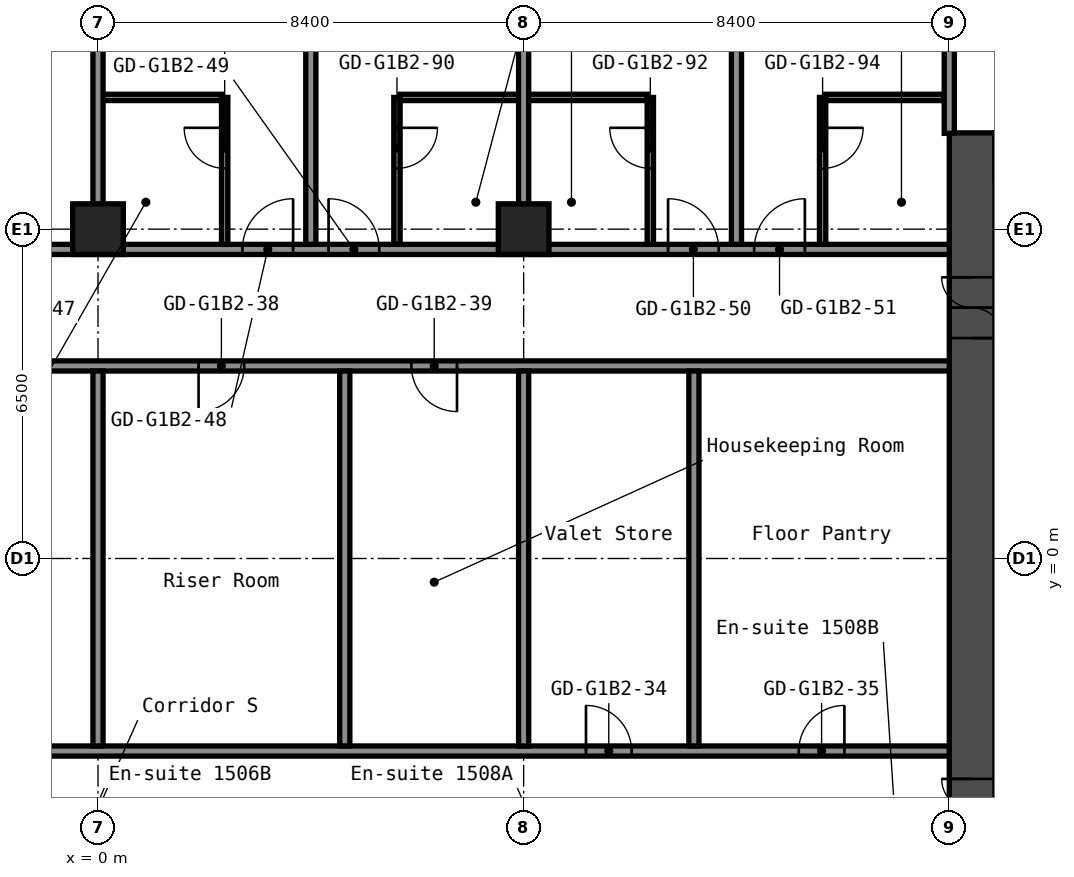
"""IFC4 building model, lengths in metres.
Left out: names, types, materials, properties, quantities, classifications, styles, units other than length and angle.
Written with IfcOpenShell. Run it as: python <this file> out.ifc"""

import sys

from ifc_helpers import new_model, si_unit, direction, frame, frame_2d, origin, origin_2d, place, context, subcontext, project, spatial, rectangle, hollow_rectangle, extrude, element, fill, save


model = new_model("IFC4")
c1 = context("Model", 3, precision=1e-05, world=origin(), true_north=direction((0.0, 1.0)))
c2 = subcontext(c1, "Body", "Model", "MODEL_VIEW")
j1 = project(units=[si_unit("LENGTHUNIT", "METRE"), si_unit("PLANEANGLEUNIT", "RADIAN")], contexts=[c1])
p1 = place(None, origin())
s1 = spatial("IfcSite", under=j1, at=p1, CompositionType="ELEMENT")
p2 = place(p1, origin())
s2 = spatial("IfcBuilding", under=s1, at=p2, CompositionType="ELEMENT")
p3 = place(p2, frame((0.0, 0.0, 55.0)))
s3 = spatial("IfcBuildingStorey", under=s2, at=p3, CompositionType="ELEMENT", Elevation=55.0)
for number, where, z_axis, x_axis in (
    (1, (0.0, 6.5, 0.0), (0.0, 0.0, 1.0), (1.0, 0.0, 0.0)),
    (2, (8.4, 6.5, 0.0), (0.0, 0.0, 1.0), (1.0, 0.0, 0.0)),
):
    element("IfcColumn", number, at=place(p3, frame(where, z_axis=z_axis, x_axis=x_axis)), inside=s3, PredefinedType="COLUMN", context=c2, shape_type="SweptSolid", body=[
        extrude(hollow_rectangle(XDim=1.0, YDim=1.0, WallThickness=0.04, at=origin_2d()), origin(), (0.0, 0.0, 1.0), 2.8),
    ])
p4 = place(p3, frame((17.25, -8.4, 0.0), z_axis=(0.0, 0.0, 1.0), x_axis=(0.0, 1.0, 0.0)))
e3 = element("IfcWall", 3, at=p4, inside=s3, PredefinedType="SHEAR", context=c2, shape_type="SweptSolid", body=[
    extrude(rectangle(XDim=16.8, YDim=0.9, at=frame_2d((8.4, 0.0))), origin(), (0.0, 0.0, 1.0), 2.8),
])
p5 = place(p4, frame((12.75, 0.0, 0.0)))
e4 = element("IfcOpeningElement", 4, at=p5, cuts=e3, PredefinedType="OPENING", context=c2, shape_type="SweptSolid", body=[
    extrude(rectangle(XDim=1.2, YDim=2.1, at=frame_2d((0.6, 1.05))), frame((0.0, 0.46, 0.0), z_axis=(0.0, -1.0, 0.0), x_axis=(1.0, 0.0, 0.0)), (0.0, 0.0, 1.0), 0.92),
])
p6 = place(p4, frame((2.85, 0.0, 0.0)))
e5 = element("IfcOpeningElement", 5, at=p6, cuts=e3, PredefinedType="OPENING", context=c2, shape_type="SweptSolid", body=[
    extrude(rectangle(XDim=1.2, YDim=2.1, at=frame_2d((0.6, 1.05))), frame((0.0, 0.46, 0.0), z_axis=(0.0, -1.0, 0.0), x_axis=(1.0, 0.0, 0.0)), (0.0, 0.0, 1.0), 0.92),
])
p7 = place(p3, frame((17.7, 7.95, 0.0), z_axis=(0.0, 0.0, 1.0), x_axis=(1.0, 0.0, 0.0)))
e6 = element("IfcWall", 6, at=p7, inside=s3, PredefinedType="SHEAR", context=c2, shape_type="SweptSolid", body=[
    extrude(rectangle(XDim=15.0, YDim=0.9, at=frame_2d((7.5, 0.0))), origin(), (0.0, 0.0, 1.0), 2.8),
])
p8 = place(p7, frame((10.4, 0.0, 0.0)))
e7 = element("IfcOpeningElement", 7, at=p8, cuts=e6, PredefinedType="OPENING", context=c2, shape_type="SweptSolid", body=[
    extrude(rectangle(XDim=1.2, YDim=2.1, at=frame_2d((0.6, 1.05))), frame((0.0, 0.46, 0.0), z_axis=(0.0, -1.0, 0.0), x_axis=(1.0, 0.0, 0.0)), (0.0, 0.0, 1.0), 0.92),
])
p9 = place(p7, frame((13.35, 0.0, 0.0)))
e8 = element("IfcOpeningElement", 8, at=p9, cuts=e6, PredefinedType="OPENING", context=c2, shape_type="SweptSolid", body=[
    extrude(rectangle(XDim=0.9, YDim=2.1, at=frame_2d((0.45, 1.05))), frame((0.0, 0.46, 0.0), z_axis=(0.0, -1.0, 0.0), x_axis=(1.0, 0.0, 0.0)), (0.0, 0.0, 1.0), 0.92),
])
p10 = place(p3, frame((-16.8, -3.8, 0.0), z_axis=(0.0, 0.0, 1.0), x_axis=(1.0, 0.0, 0.0)))
e9 = element("IfcWall", 9, at=p10, inside=s3, PredefinedType="PARTITIONING", context=c2, shape_type="SweptSolid", body=[
    extrude(rectangle(XDim=33.6, YDim=0.2, at=frame_2d((16.8, 0.0))), origin(), (0.0, 0.0, 1.0), 2.8),
])
p11 = place(p10, frame((9.8, 0.0, 0.0)))
e10 = element("IfcOpeningElement", 10, at=p11, cuts=e9, PredefinedType="OPENING", context=c2, shape_type="SweptSolid", body=[
    extrude(rectangle(XDim=0.9, YDim=2.1, at=frame_2d((0.45, 1.05))), frame((0.0, 0.11, 0.0), z_axis=(0.0, -1.0, 0.0), x_axis=(1.0, 0.0, 0.0)), (0.0, 0.0, 1.0), 0.22),
])
p12 = place(p10, frame((14.0, 0.0, 0.0)))
e11 = element("IfcOpeningElement", 11, at=p12, cuts=e9, PredefinedType="OPENING", context=c2, shape_type="SweptSolid", body=[
    extrude(rectangle(XDim=0.9, YDim=2.1, at=frame_2d((0.45, 1.05))), frame((0.0, 0.11, 0.0), z_axis=(0.0, -1.0, 0.0), x_axis=(1.0, 0.0, 0.0)), (0.0, 0.0, 1.0), 0.22),
])
p13 = place(p10, frame((26.43, 0.0, 0.0)))
e12 = element("IfcOpeningElement", 12, at=p13, cuts=e9, PredefinedType="OPENING", context=c2, shape_type="SweptSolid", body=[
    extrude(rectangle(XDim=0.9, YDim=2.1, at=frame_2d((0.45, 1.05))), frame((0.0, 0.11, 0.0), z_axis=(0.0, -1.0, 0.0), x_axis=(1.0, 0.0, 0.0)), (0.0, 0.0, 1.0), 0.22),
])
p14 = place(p10, frame((30.63, 0.0, 0.0)))
e13 = element("IfcOpeningElement", 13, at=p14, cuts=e9, PredefinedType="OPENING", context=c2, shape_type="SweptSolid", body=[
    extrude(rectangle(XDim=0.9, YDim=2.1, at=frame_2d((0.45, 1.05))), frame((0.0, 0.11, 0.0), z_axis=(0.0, -1.0, 0.0), x_axis=(1.0, 0.0, 0.0)), (0.0, 0.0, 1.0), 0.22),
])
p15 = place(p3, frame((-16.8, 3.8, 0.0), z_axis=(0.0, 0.0, 1.0), x_axis=(1.0, 0.0, 0.0)))
e14 = element("IfcWall", 14, at=p15, inside=s3, PredefinedType="PARTITIONING", context=c2, shape_type="SweptSolid", body=[
    extrude(rectangle(XDim=33.6, YDim=0.2, at=frame_2d((16.8, 0.0))), origin(), (0.0, 0.0, 1.0), 2.8),
])
p16 = place(p15, frame((1.48, 0.0, 0.0)))
e15 = element("IfcOpeningElement", 15, at=p16, cuts=e14, PredefinedType="OPENING", context=c2, shape_type="SweptSolid", body=[
    extrude(rectangle(XDim=0.9, YDim=2.1, at=frame_2d((0.45, 1.05))), frame((0.0, 0.11, 0.0), z_axis=(0.0, -1.0, 0.0), x_axis=(1.0, 0.0, 0.0)), (0.0, 0.0, 1.0), 0.22),
])
p17 = place(p15, frame((5.68, 0.0, 0.0)))
e16 = element("IfcOpeningElement", 16, at=p17, cuts=e14, PredefinedType="OPENING", context=c2, shape_type="SweptSolid", body=[
    extrude(rectangle(XDim=0.9, YDim=2.1, at=frame_2d((0.45, 1.05))), frame((0.0, 0.11, 0.0), z_axis=(0.0, -1.0, 0.0), x_axis=(1.0, 0.0, 0.0)), (0.0, 0.0, 1.0), 0.22),
])
p18 = place(p15, frame((18.785, 0.0, 0.0)))
e17 = element("IfcOpeningElement", 17, at=p18, cuts=e14, PredefinedType="OPENING", context=c2, shape_type="SweptSolid", body=[
    extrude(rectangle(XDim=0.9, YDim=2.1, at=frame_2d((0.45, 1.05))), frame((0.0, 0.11, 0.0), z_axis=(0.0, -1.0, 0.0), x_axis=(1.0, 0.0, 0.0)), (0.0, 0.0, 1.0), 0.22),
])
p19 = place(p15, frame((22.985, 0.0, 0.0)))
e18 = element("IfcOpeningElement", 18, at=p19, cuts=e14, PredefinedType="OPENING", context=c2, shape_type="SweptSolid", body=[
    extrude(rectangle(XDim=0.9, YDim=2.1, at=frame_2d((0.45, 1.05))), frame((0.0, 0.11, 0.0), z_axis=(0.0, -1.0, 0.0), x_axis=(1.0, 0.0, 0.0)), (0.0, 0.0, 1.0), 0.22),
])
p20 = place(p3, frame((-16.8, 6.1, 0.0), z_axis=(0.0, 0.0, 1.0), x_axis=(1.0, 0.0, 0.0)))
e19 = element("IfcWall", 19, at=p20, inside=s3, PredefinedType="PARTITIONING", context=c2, shape_type="SweptSolid", body=[
    extrude(rectangle(XDim=33.6, YDim=0.2, at=frame_2d((16.8, 0.0))), origin(), (0.0, 0.0, 1.0), 2.8),
])
p21 = place(p20, frame((2.85, 0.0, 0.0)))
e20 = element("IfcOpeningElement", 20, at=p21, cuts=e19, PredefinedType="OPENING", context=c2, shape_type="SweptSolid", body=[
    extrude(rectangle(XDim=1.0, YDim=2.1, at=frame_2d((0.5, 1.05))), frame((0.0, 0.11, 0.0), z_axis=(0.0, -1.0, 0.0), x_axis=(1.0, 0.0, 0.0)), (0.0, 0.0, 1.0), 0.22),
])
p22 = place(p20, frame((4.55, 0.0, 0.0)))
e21 = element("IfcOpeningElement", 21, at=p22, cuts=e19, PredefinedType="OPENING", context=c2, shape_type="SweptSolid", body=[
    extrude(rectangle(XDim=1.0, YDim=2.1, at=frame_2d((0.5, 1.05))), frame((0.0, 0.11, 0.0), z_axis=(0.0, -1.0, 0.0), x_axis=(1.0, 0.0, 0.0)), (0.0, 0.0, 1.0), 0.22),
])
p23 = place(p20, frame((10.555, 0.0, 0.0)))
e22 = element("IfcOpeningElement", 22, at=p23, cuts=e19, PredefinedType="OPENING", context=c2, shape_type="SweptSolid", body=[
    extrude(rectangle(XDim=0.9, YDim=2.1, at=frame_2d((0.45, 1.05))), frame((0.0, 0.11, 0.0), z_axis=(0.0, -1.0, 0.0), x_axis=(1.0, 0.0, 0.0)), (0.0, 0.0, 1.0), 0.22),
])
p24 = place(p20, frame((14.755, 0.0, 0.0)))
e23 = element("IfcOpeningElement", 23, at=p24, cuts=e19, PredefinedType="OPENING", context=c2, shape_type="SweptSolid", body=[
    extrude(rectangle(XDim=0.9, YDim=2.1, at=frame_2d((0.45, 1.05))), frame((0.0, 0.11, 0.0), z_axis=(0.0, -1.0, 0.0), x_axis=(1.0, 0.0, 0.0)), (0.0, 0.0, 1.0), 0.22),
])
p25 = place(p20, frame((19.65, 0.0, 0.0)))
e24 = element("IfcOpeningElement", 24, at=p25, cuts=e19, PredefinedType="OPENING", context=c2, shape_type="SweptSolid", body=[
    extrude(rectangle(XDim=1.0, YDim=2.1, at=frame_2d((0.5, 1.05))), frame((0.0, 0.11, 0.0), z_axis=(0.0, -1.0, 0.0), x_axis=(1.0, 0.0, 0.0)), (0.0, 0.0, 1.0), 0.22),
])
p26 = place(p20, frame((21.35, 0.0, 0.0)))
e25 = element("IfcOpeningElement", 25, at=p26, cuts=e19, PredefinedType="OPENING", context=c2, shape_type="SweptSolid", body=[
    extrude(rectangle(XDim=1.0, YDim=2.1, at=frame_2d((0.5, 1.05))), frame((0.0, 0.11, 0.0), z_axis=(0.0, -1.0, 0.0), x_axis=(1.0, 0.0, 0.0)), (0.0, 0.0, 1.0), 0.22),
])
p27 = place(p20, frame((28.05, 0.0, 0.0)))
e26 = element("IfcOpeningElement", 26, at=p27, cuts=e19, PredefinedType="OPENING", context=c2, shape_type="SweptSolid", body=[
    extrude(rectangle(XDim=1.0, YDim=2.1, at=frame_2d((0.5, 1.05))), frame((0.0, 0.11, 0.0), z_axis=(0.0, -1.0, 0.0), x_axis=(1.0, 0.0, 0.0)), (0.0, 0.0, 1.0), 0.22),
])
p28 = place(p20, frame((29.75, 0.0, 0.0)))
e27 = element("IfcOpeningElement", 27, at=p28, cuts=e19, PredefinedType="OPENING", context=c2, shape_type="SweptSolid", body=[
    extrude(rectangle(XDim=1.0, YDim=2.1, at=frame_2d((0.5, 1.05))), frame((0.0, 0.11, 0.0), z_axis=(0.0, -1.0, 0.0), x_axis=(1.0, 0.0, 0.0)), (0.0, 0.0, 1.0), 0.22),
])
p29 = place(p3, frame((0.1, 9.1, 0.0), z_axis=(0.0, 0.0, 1.0), x_axis=(1.0, 0.0, 0.0)))
e28 = element("IfcWall", 28, at=p29, inside=s3, PredefinedType="PARTITIONING", context=c2, shape_type="SweptSolid", body=[
    extrude(rectangle(XDim=2.337, YDim=0.125, at=frame_2d((1.169, 0.0))), origin(), (0.0, 0.0, 1.0), 2.8),
])
p30 = place(p3, frame((5.962, 9.1, 0.0), z_axis=(0.0, 0.0, 1.0), x_axis=(1.0, 0.0, 0.0)))
e29 = element("IfcWall", 29, at=p30, inside=s3, PredefinedType="PARTITIONING", context=c2, shape_type="SweptSolid", body=[
    extrude(rectangle(XDim=4.875, YDim=0.125, at=frame_2d((2.438, 0.0))), origin(), (0.0, 0.0, 1.0), 2.8),
])
p31 = place(p3, frame((14.363, 9.1, 0.0), z_axis=(0.0, 0.0, 1.0), x_axis=(1.0, 0.0, 0.0)))
e30 = element("IfcWall", 30, at=p31, inside=s3, PredefinedType="PARTITIONING", context=c2, shape_type="SweptSolid", body=[
    extrude(rectangle(XDim=2.337, YDim=0.125, at=frame_2d((1.169, 0.0))), origin(), (0.0, 0.0, 1.0), 2.8),
])
p32 = place(p3, frame((0.0, -3.7, 0.0), z_axis=(0.0, 0.0, 1.0), x_axis=(0.0, 1.0, 0.0)))
e31 = element("IfcWall", 31, at=p32, inside=s3, PredefinedType="PARTITIONING", context=c2, shape_type="SweptSolid", body=[
    extrude(rectangle(XDim=7.4, YDim=0.2, at=frame_2d((3.7, 0.0))), origin(), (0.0, 0.0, 1.0), 2.8),
])
p33 = place(p3, frame((0.0, 6.99, 0.0), z_axis=(0.0, 0.0, 1.0), x_axis=(0.0, 1.0, 0.0)))
e32 = element("IfcWall", 32, at=p33, inside=s3, PredefinedType="PARTITIONING", context=c2, shape_type="SweptSolid", body=[
    extrude(rectangle(XDim=13.31, YDim=0.2, at=frame_2d((6.655, 0.0))), origin(), (0.0, 0.0, 1.0), 2.8),
])
p34 = place(p3, frame((2.5, 6.2, 0.0), z_axis=(0.0, 0.0, 1.0), x_axis=(0.0, 1.0, 0.0)))
e33 = element("IfcWall", 33, at=p34, inside=s3, PredefinedType="PARTITIONING", context=c2, shape_type="SweptSolid", body=[
    extrude(rectangle(XDim=2.9, YDim=0.125, at=frame_2d((1.45, 0.0))), origin(), (0.0, 0.0, 1.0), 2.8),
])
p35 = place(p34, frame((1.5, 0.0, 0.0)))
e34 = element("IfcOpeningElement", 34, at=p35, cuts=e33, PredefinedType="OPENING", context=c2, shape_type="SweptSolid", body=[
    extrude(rectangle(XDim=0.8, YDim=2.1, at=frame_2d((0.4, 1.05))), frame((0.0, 0.073, 0.0), z_axis=(0.0, -1.0, 0.0), x_axis=(1.0, 0.0, 0.0)), (0.0, 0.0, 1.0), 0.145),
])
p36 = place(p3, frame((4.2, 6.2, 0.0), z_axis=(0.0, 0.0, 1.0), x_axis=(0.0, 1.0, 0.0)))
e35 = element("IfcWall", 35, at=p36, inside=s3, PredefinedType="PARTITIONING", context=c2, shape_type="SweptSolid", body=[
    extrude(rectangle(XDim=14.1, YDim=0.2, at=frame_2d((7.05, 0.0))), origin(), (0.0, 0.0, 1.0), 2.8),
])
p37 = place(p3, frame((4.87, -3.7, 0.0), z_axis=(0.0, 0.0, 1.0), x_axis=(0.0, 1.0, 0.0)))
e36 = element("IfcWall", 36, at=p37, inside=s3, PredefinedType="PARTITIONING", context=c2, shape_type="SweptSolid", body=[
    extrude(rectangle(XDim=7.4, YDim=0.2, at=frame_2d((3.7, 0.0))), origin(), (0.0, 0.0, 1.0), 2.8),
])
p38 = place(p3, frame((5.9, 6.2, 0.0), z_axis=(0.0, 0.0, 1.0), x_axis=(0.0, 1.0, 0.0)))
e37 = element("IfcWall", 37, at=p38, inside=s3, PredefinedType="PARTITIONING", context=c2, shape_type="SweptSolid", body=[
    extrude(rectangle(XDim=2.9, YDim=0.125, at=frame_2d((1.45, 0.0))), origin(), (0.0, 0.0, 1.0), 2.8),
])
p39 = place(p38, frame((1.5, 0.0, 0.0)))
e38 = element("IfcOpeningElement", 38, at=p39, cuts=e37, PredefinedType="OPENING", context=c2, shape_type="SweptSolid", body=[
    extrude(rectangle(XDim=0.8, YDim=2.1, at=frame_2d((0.4, 1.05))), frame((0.0, 0.073, 0.0), z_axis=(0.0, -1.0, 0.0), x_axis=(1.0, 0.0, 0.0)), (0.0, 0.0, 1.0), 0.145),
])
p40 = place(p3, frame((8.4, -3.7, 0.0), z_axis=(0.0, 0.0, 1.0), x_axis=(0.0, 1.0, 0.0)))
e39 = element("IfcWall", 39, at=p40, inside=s3, PredefinedType="PARTITIONING", context=c2, shape_type="SweptSolid", body=[
    extrude(rectangle(XDim=7.4, YDim=0.2, at=frame_2d((3.7, 0.0))), origin(), (0.0, 0.0, 1.0), 2.8),
])
p41 = place(p3, frame((8.4, 6.99, 0.0), z_axis=(0.0, 0.0, 1.0), x_axis=(0.0, 1.0, 0.0)))
e40 = element("IfcWall", 40, at=p41, inside=s3, PredefinedType="PARTITIONING", context=c2, shape_type="SweptSolid", body=[
    extrude(rectangle(XDim=13.31, YDim=0.2, at=frame_2d((6.655, 0.0))), origin(), (0.0, 0.0, 1.0), 2.8),
])
p42 = place(p3, frame((10.9, 6.2, 0.0), z_axis=(0.0, 0.0, 1.0), x_axis=(0.0, 1.0, 0.0)))
e41 = element("IfcWall", 41, at=p42, inside=s3, PredefinedType="PARTITIONING", context=c2, shape_type="SweptSolid", body=[
    extrude(rectangle(XDim=2.9, YDim=0.125, at=frame_2d((1.45, 0.0))), origin(), (0.0, 0.0, 1.0), 2.8),
])
p43 = place(p42, frame((1.5, 0.0, 0.0)))
e42 = element("IfcOpeningElement", 42, at=p43, cuts=e41, PredefinedType="OPENING", context=c2, shape_type="SweptSolid", body=[
    extrude(rectangle(XDim=0.8, YDim=2.1, at=frame_2d((0.4, 1.05))), frame((0.0, 0.073, 0.0), z_axis=(0.0, -1.0, 0.0), x_axis=(1.0, 0.0, 0.0)), (0.0, 0.0, 1.0), 0.145),
])
p44 = place(p3, frame((11.76, -3.7, 0.0), z_axis=(0.0, 0.0, 1.0), x_axis=(0.0, 1.0, 0.0)))
e43 = element("IfcWall", 43, at=p44, inside=s3, PredefinedType="PARTITIONING", context=c2, shape_type="SweptSolid", body=[
    extrude(rectangle(XDim=7.4, YDim=0.2, at=frame_2d((3.7, 0.0))), origin(), (0.0, 0.0, 1.0), 2.8),
])
p45 = place(p3, frame((12.6, 6.2, 0.0), z_axis=(0.0, 0.0, 1.0), x_axis=(0.0, 1.0, 0.0)))
e44 = element("IfcWall", 44, at=p45, inside=s3, PredefinedType="PARTITIONING", context=c2, shape_type="SweptSolid", body=[
    extrude(rectangle(XDim=14.1, YDim=0.2, at=frame_2d((7.05, 0.0))), origin(), (0.0, 0.0, 1.0), 2.8),
])
p46 = place(p3, frame((14.3, 6.2, 0.0), z_axis=(0.0, 0.0, 1.0), x_axis=(0.0, 1.0, 0.0)))
e45 = element("IfcWall", 45, at=p46, inside=s3, PredefinedType="PARTITIONING", context=c2, shape_type="SweptSolid", body=[
    extrude(rectangle(XDim=2.9, YDim=0.125, at=frame_2d((1.45, 0.0))), origin(), (0.0, 0.0, 1.0), 2.8),
])
p47 = place(p46, frame((1.5, 0.0, 0.0)))
e46 = element("IfcOpeningElement", 46, at=p47, cuts=e45, PredefinedType="OPENING", context=c2, shape_type="SweptSolid", body=[
    extrude(rectangle(XDim=0.8, YDim=2.1, at=frame_2d((0.4, 1.05))), frame((0.0, 0.073, 0.0), z_axis=(0.0, -1.0, 0.0), x_axis=(1.0, 0.0, 0.0)), (0.0, 0.0, 1.0), 0.145),
])
p48 = place(p3, frame((16.8, 8.39, 0.0), z_axis=(0.0, 0.0, 1.0), x_axis=(0.0, 1.0, 0.0)))
e47 = element("IfcWall", 47, at=p48, inside=s3, PredefinedType="PARTITIONING", context=c2, shape_type="SweptSolid", body=[
    extrude(rectangle(XDim=11.91, YDim=0.2, at=frame_2d((5.955, 0.0))), origin(), (0.0, 0.0, 1.0), 2.8),
])
p49 = place(p5, origin())
e48 = element("IfcDoor", 48, at=p49, inside=s3, OperationType="DOUBLE_DOOR_SINGLE_SWING", PredefinedType="DOOR", context=c2, shape_type="SweptSolid", body=[
    extrude(rectangle(XDim=1.2, YDim=2.1, at=frame_2d((0.6, 1.05))), frame((0.0, 0.025, 0.0), z_axis=(0.0, -1.0, 0.0), x_axis=(1.0, 0.0, 0.0)), (0.0, 0.0, 1.0), 0.05),
])
fill(e4, e48)
p50 = place(p6, origin())
e49 = element("IfcDoor", 49, at=p50, inside=s3, OperationType="DOUBLE_DOOR_SINGLE_SWING", PredefinedType="DOOR", context=c2, shape_type="SweptSolid", body=[
    extrude(rectangle(XDim=1.2, YDim=2.1, at=frame_2d((0.6, 1.05))), frame((0.0, 0.025, 0.0), z_axis=(0.0, -1.0, 0.0), x_axis=(1.0, 0.0, 0.0)), (0.0, 0.0, 1.0), 0.05),
])
fill(e5, e49)
p51 = place(p13, origin())
e50 = element("IfcDoor", 50, at=p51, inside=s3, OperationType="SINGLE_SWING_RIGHT", PredefinedType="DOOR", context=c2, shape_type="SweptSolid", body=[
    extrude(rectangle(XDim=0.9, YDim=2.1, at=frame_2d((0.45, 1.05))), frame((0.0, 0.025, 0.0), z_axis=(0.0, -1.0, 0.0), x_axis=(1.0, 0.0, 0.0)), (0.0, 0.0, 1.0), 0.05),
])
fill(e12, e50)
p52 = place(p14, origin())
e51 = element("IfcDoor", 51, at=p52, inside=s3, OperationType="SINGLE_SWING_LEFT", PredefinedType="DOOR", context=c2, shape_type="SweptSolid", body=[
    extrude(rectangle(XDim=0.9, YDim=2.1, at=frame_2d((0.45, 1.05))), frame((0.0, 0.025, 0.0), z_axis=(0.0, -1.0, 0.0), x_axis=(1.0, 0.0, 0.0)), (0.0, 0.0, 1.0), 0.05),
])
fill(e13, e51)
p53 = place(p18, origin())
e52 = element("IfcDoor", 52, at=p53, inside=s3, OperationType="SINGLE_SWING_LEFT", PredefinedType="DOOR", context=c2, shape_type="SweptSolid", body=[
    extrude(rectangle(XDim=0.9, YDim=2.1, at=frame_2d((0.45, 1.05))), frame((0.0, 0.025, 0.0), z_axis=(0.0, -1.0, 0.0), x_axis=(1.0, 0.0, 0.0)), (0.0, 0.0, 1.0), 0.05),
])
fill(e17, e52)
p54 = place(p19, origin())
e53 = element("IfcDoor", 53, at=p54, inside=s3, OperationType="SINGLE_SWING_RIGHT", PredefinedType="DOOR", context=c2, shape_type="SweptSolid", body=[
    extrude(rectangle(XDim=0.9, YDim=2.1, at=frame_2d((0.45, 1.05))), frame((0.0, 0.025, 0.0), z_axis=(0.0, -1.0, 0.0), x_axis=(1.0, 0.0, 0.0)), (0.0, 0.0, 1.0), 0.05),
])
fill(e18, e53)
p55 = place(p25, origin())
e54 = element("IfcDoor", 54, at=p55, inside=s3, OperationType="SINGLE_SWING_LEFT", PredefinedType="DOOR", context=c2, shape_type="SweptSolid", body=[
    extrude(rectangle(XDim=1.0, YDim=2.1, at=frame_2d((0.5, 1.05))), frame((0.0, 0.025, 0.0), z_axis=(0.0, -1.0, 0.0), x_axis=(1.0, 0.0, 0.0)), (0.0, 0.0, 1.0), 0.05),
])
fill(e24, e54)
p56 = place(p26, origin())
e55 = element("IfcDoor", 55, at=p56, inside=s3, OperationType="SINGLE_SWING_RIGHT", PredefinedType="DOOR", context=c2, shape_type="SweptSolid", body=[
    extrude(rectangle(XDim=1.0, YDim=2.1, at=frame_2d((0.5, 1.05))), frame((0.0, 0.025, 0.0), z_axis=(0.0, -1.0, 0.0), x_axis=(1.0, 0.0, 0.0)), (0.0, 0.0, 1.0), 0.05),
])
fill(e25, e55)
p57 = place(p27, origin())
e56 = element("IfcDoor", 56, at=p57, inside=s3, OperationType="SINGLE_SWING_RIGHT", PredefinedType="DOOR", context=c2, shape_type="SweptSolid", body=[
    extrude(rectangle(XDim=1.0, YDim=2.1, at=frame_2d((0.5, 1.05))), frame((0.0, 0.025, 0.0), z_axis=(0.0, -1.0, 0.0), x_axis=(1.0, 0.0, 0.0)), (0.0, 0.0, 1.0), 0.05),
])
fill(e26, e56)
p58 = place(p28, origin())
e57 = element("IfcDoor", 57, at=p58, inside=s3, OperationType="SINGLE_SWING_LEFT", PredefinedType="DOOR", context=c2, shape_type="SweptSolid", body=[
    extrude(rectangle(XDim=1.0, YDim=2.1, at=frame_2d((0.5, 1.05))), frame((0.0, 0.025, 0.0), z_axis=(0.0, -1.0, 0.0), x_axis=(1.0, 0.0, 0.0)), (0.0, 0.0, 1.0), 0.05),
])
fill(e27, e57)
p59 = place(p35, origin())
e58 = element("IfcDoor", 58, at=p59, inside=s3, OperationType="SINGLE_SWING_LEFT", PredefinedType="DOOR", context=c2, shape_type="SweptSolid", body=[
    extrude(rectangle(XDim=0.8, YDim=2.1, at=frame_2d((0.4, 1.05))), frame((0.0, 0.025, 0.0), z_axis=(0.0, -1.0, 0.0), x_axis=(1.0, 0.0, 0.0)), (0.0, 0.0, 1.0), 0.05),
])
fill(e34, e58)
p60 = place(p39, origin())
e59 = element("IfcDoor", 59, at=p60, inside=s3, OperationType="SINGLE_SWING_RIGHT", PredefinedType="DOOR", context=c2, shape_type="SweptSolid", body=[
    extrude(rectangle(XDim=0.8, YDim=2.1, at=frame_2d((0.4, 1.05))), frame((0.0, 0.025, 0.0), z_axis=(0.0, -1.0, 0.0), x_axis=(1.0, 0.0, 0.0)), (0.0, 0.0, 1.0), 0.05),
])
fill(e38, e59)
p61 = place(p43, origin())
e60 = element("IfcDoor", 60, at=p61, inside=s3, OperationType="SINGLE_SWING_LEFT", PredefinedType="DOOR", context=c2, shape_type="SweptSolid", body=[
    extrude(rectangle(XDim=0.8, YDim=2.1, at=frame_2d((0.4, 1.05))), frame((0.0, 0.025, 0.0), z_axis=(0.0, -1.0, 0.0), x_axis=(1.0, 0.0, 0.0)), (0.0, 0.0, 1.0), 0.05),
])
fill(e42, e60)
p62 = place(p47, origin())
e61 = element("IfcDoor", 61, at=p62, inside=s3, OperationType="SINGLE_SWING_RIGHT", PredefinedType="DOOR", context=c2, shape_type="SweptSolid", body=[
    extrude(rectangle(XDim=0.8, YDim=2.1, at=frame_2d((0.4, 1.05))), frame((0.0, 0.025, 0.0), z_axis=(0.0, -1.0, 0.0), x_axis=(1.0, 0.0, 0.0)), (0.0, 0.0, 1.0), 0.05),
])
fill(e46, e61)
save(model, sys.argv[1])
